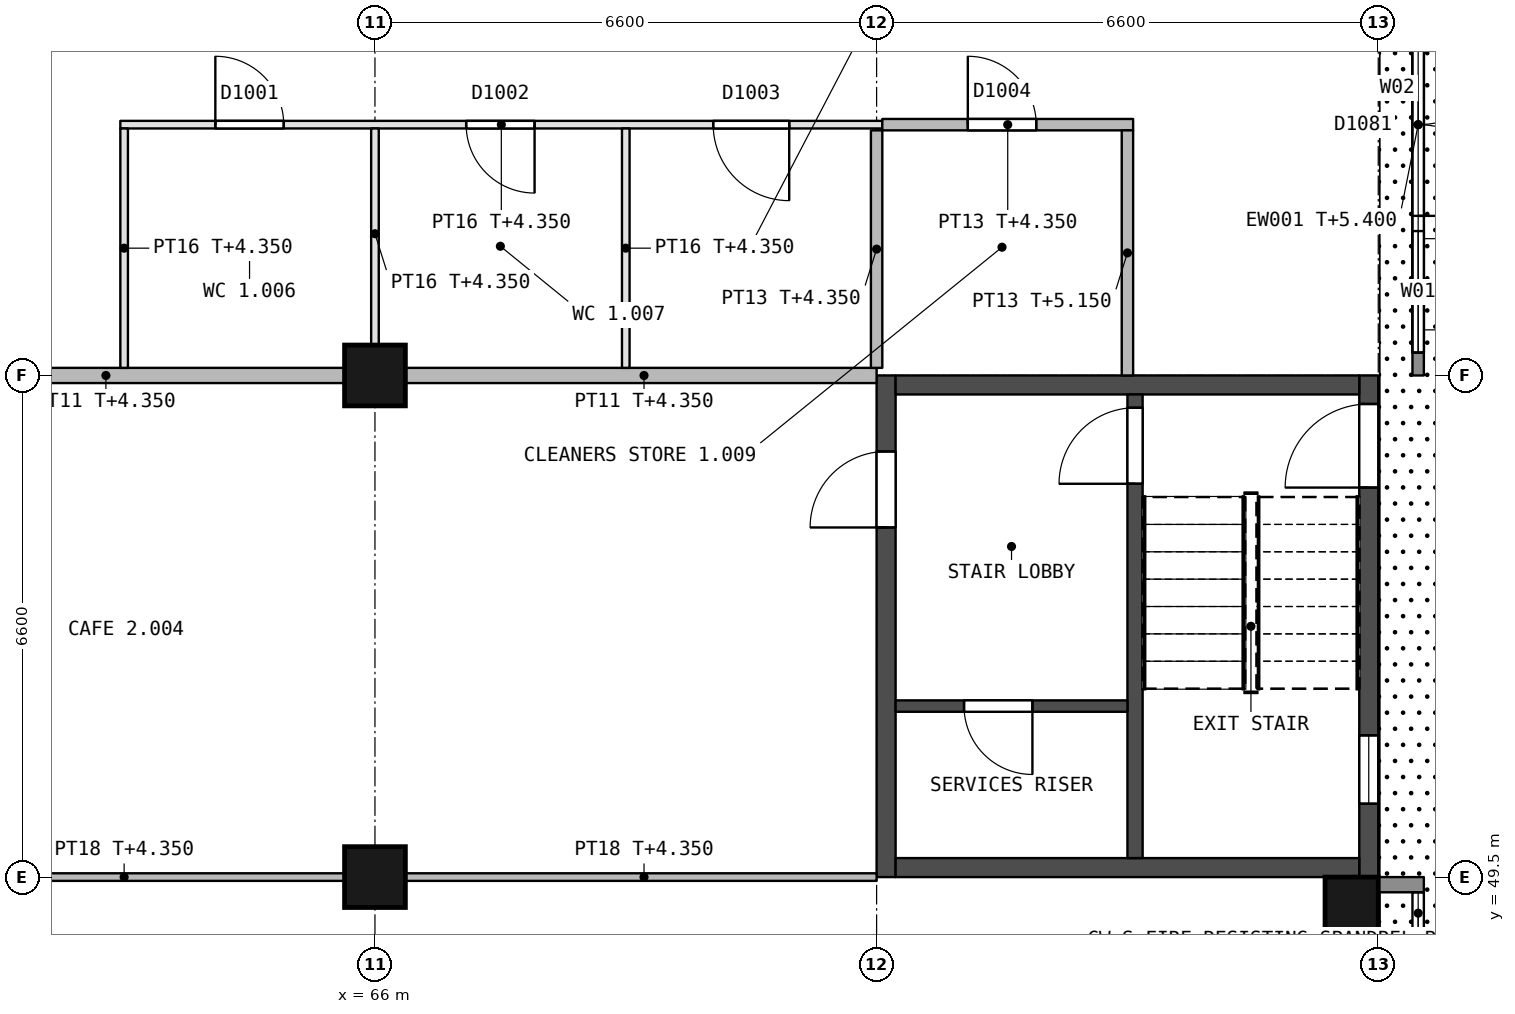
"""IFC4 building model, lengths in metres.
Left out: names, types, materials, properties, quantities, classifications, styles, units other than length and angle.
Written with IfcOpenShell. Run it as: python <this file> out.ifc"""

import sys

from ifc_helpers import new_model, si_unit, direction, frame, frame_2d, origin, origin_2d, place, context, subcontext, project, spatial, rectangle, extrude, element, fill, save


model = new_model("IFC4")
c1 = context("Model", 3, precision=1e-05, world=origin(), true_north=direction((0.0, 1.0)))
c2 = subcontext(c1, "Body", "Model", "MODEL_VIEW")
j1 = project(units=[si_unit("LENGTHUNIT", "METRE"), si_unit("PLANEANGLEUNIT", "RADIAN")], contexts=[c1])
p1 = place(None, origin())
s1 = spatial("IfcSite", under=j1, at=p1, CompositionType="ELEMENT")
p2 = place(p1, origin())
s2 = spatial("IfcBuilding", under=s1, at=p2, CompositionType="ELEMENT")
p3 = place(p2, origin())
s3 = spatial("IfcBuildingStorey", under=s2, at=p3, CompositionType="ELEMENT", Elevation=0.0)
p4 = place(p3, frame((66.0, 56.1, 0.0), z_axis=(0.0, 0.0, 1.0), x_axis=(1.0, 0.0, 0.0)))
e1 = element("IfcColumn", 1, at=p4, inside=s3, PredefinedType="COLUMN", context=c2, shape_type="SweptSolid", body=[
    extrude(rectangle(XDim=0.8, YDim=0.8, at=origin_2d()), origin(), (0.0, 0.0, 1.0), 5.4),
])
p5 = place(p3, frame((78.85, 49.15, 0.0), z_axis=(0.0, 0.0, 1.0), x_axis=(1.0, 0.0, 0.0)))
e2 = element("IfcColumn", 2, at=p5, inside=s3, PredefinedType="COLUMN", context=c2, shape_type="SweptSolid", body=[
    extrude(rectangle(XDim=0.7, YDim=0.7, at=origin_2d()), origin(), (0.0, 0.0, 1.0), 5.4),
])
p6 = place(p3, frame((66.0, 49.5, 0.0), z_axis=(0.0, 0.0, 1.0), x_axis=(1.0, 0.0, 0.0)))
e3 = element("IfcColumn", 3, at=p6, inside=s3, PredefinedType="COLUMN", context=c2, shape_type="SweptSolid", body=[
    extrude(rectangle(XDim=0.8, YDim=0.8, at=origin_2d()), origin(), (0.0, 0.0, 1.0), 5.4),
])
p7 = place(p3, frame((72.725, 56.1, 0.0), z_axis=(0.0, 0.0, 1.0), x_axis=(0.0, -1.0, 0.0)))
e4 = element("IfcWall", 4, at=p7, inside=s3, PredefinedType="SHEAR", context=c2, shape_type="SweptSolid", body=[
    extrude(rectangle(XDim=6.6, YDim=0.25, at=frame_2d((3.3, 0.0))), origin(), (0.0, 0.0, 1.0), 5.15),
])
p8 = place(p7, frame((1.0, 0.0, 0.0)))
e5 = element("IfcOpeningElement", 5, at=p8, cuts=e4, PredefinedType="OPENING", context=c2, shape_type="SweptSolid", body=[
    extrude(rectangle(XDim=1.0, YDim=2.1, at=frame_2d((0.5, 1.05))), frame((0.0, 0.135, 0.0), z_axis=(0.0, -1.0, 0.0), x_axis=(1.0, 0.0, 0.0)), (0.0, 0.0, 1.0), 0.27),
])
p9 = place(p3, frame((79.075, 56.1, 0.0), z_axis=(0.0, 0.0, 1.0), x_axis=(0.0, -1.0, 0.0)))
e6 = element("IfcWall", 6, at=p9, inside=s3, PredefinedType="SHEAR", context=c2, shape_type="SweptSolid", body=[
    extrude(rectangle(XDim=6.6, YDim=0.25, at=frame_2d((3.3, 0.0))), origin(), (0.0, 0.0, 1.0), 5.15),
])
p10 = place(p9, frame((0.375, 0.0, 0.0)))
e7 = element("IfcOpeningElement", 7, at=p10, cuts=e6, PredefinedType="OPENING", context=c2, shape_type="SweptSolid", body=[
    extrude(rectangle(XDim=1.1, YDim=2.4, at=frame_2d((0.55, 1.2))), frame((0.0, 0.135, 0.0), z_axis=(0.0, -1.0, 0.0), x_axis=(1.0, 0.0, 0.0)), (0.0, 0.0, 1.0), 0.27),
])
p11 = place(p9, frame((4.735, 0.0, 2.05)))
e8 = element("IfcOpeningElement", 8, at=p11, cuts=e6, PredefinedType="OPENING", context=c2, shape_type="SweptSolid", body=[
    extrude(rectangle(XDim=0.9, YDim=1.2, at=frame_2d((0.45, 0.6))), frame((0.0, 0.135, 0.0), z_axis=(0.0, -1.0, 0.0), x_axis=(1.0, 0.0, 0.0)), (0.0, 0.0, 1.0), 0.27),
])
for number, where, z_axis, x_axis in (
    (9, (72.85, 55.975, 0.0), (0.0, 0.0, 1.0), (1.0, 0.0, 0.0)),
    (10, (72.85, 49.625, 0.0), (0.0, 0.0, 1.0), (1.0, 0.0, 0.0)),
):
    element("IfcWall", number, at=place(p3, frame(where, z_axis=z_axis, x_axis=x_axis)), inside=s3, PredefinedType="SHEAR", context=c2, shape_type="SweptSolid", body=[
        extrude(rectangle(XDim=6.1, YDim=0.25, at=frame_2d((3.05, 0.0))), origin(), (0.0, 0.0, 1.0), 5.15),
    ])
p12 = place(p3, frame((76.0, 55.85, 0.0), z_axis=(0.0, 0.0, 1.0), x_axis=(0.0, -1.0, 0.0)))
e11 = element("IfcWall", 11, at=p12, inside=s3, PredefinedType="SHEAR", context=c2, shape_type="SweptSolid", body=[
    extrude(rectangle(XDim=6.1, YDim=0.2, at=frame_2d((3.05, 0.0))), origin(), (0.0, 0.0, 1.0), 5.15),
])
p13 = place(p12, frame((0.175, 0.0, 0.0)))
e12 = element("IfcOpeningElement", 12, at=p13, cuts=e11, PredefinedType="OPENING", context=c2, shape_type="SweptSolid", body=[
    extrude(rectangle(XDim=1.0, YDim=2.1, at=frame_2d((0.5, 1.05))), frame((0.0, 0.11, 0.0), z_axis=(0.0, -1.0, 0.0), x_axis=(1.0, 0.0, 0.0)), (0.0, 0.0, 1.0), 0.22),
])
p14 = place(p3, frame((72.85, 51.75, 0.0), z_axis=(0.0, 0.0, 1.0), x_axis=(1.0, 0.0, 0.0)))
e13 = element("IfcWall", 13, at=p14, inside=s3, PredefinedType="SHEAR", context=c2, shape_type="SweptSolid", body=[
    extrude(rectangle(XDim=3.05, YDim=0.15, at=frame_2d((1.525, 0.0))), origin(), (0.0, 0.0, 1.0), 5.15),
])
p15 = place(p14, frame((0.9, 0.0, 0.0)))
e14 = element("IfcOpeningElement", 14, at=p15, cuts=e13, PredefinedType="OPENING", context=c2, shape_type="SweptSolid", body=[
    extrude(rectangle(XDim=0.9, YDim=2.1, at=frame_2d((0.45, 1.05))), frame((0.0, 0.085, 0.0), z_axis=(0.0, -1.0, 0.0), x_axis=(1.0, 0.0, 0.0)), (0.0, 0.0, 1.0), 0.17),
])
p16 = place(p3, frame((79.725, 62.7, 0.0), z_axis=(0.0, 0.0, 1.0), x_axis=(0.0, -1.0, 0.0)))
e15 = element("IfcWall", 15, at=p16, inside=s3, PredefinedType="STANDARD", context=c2, shape_type="SweptSolid", body=[
    extrude(rectangle(XDim=6.6, YDim=0.15, at=frame_2d((3.3, 0.0))), origin(), (0.0, 0.0, 1.0), 5.4),
])
p17 = place(p16, frame((2.1, 0.0, 0.0)))
e16 = element("IfcOpeningElement", 16, at=p17, cuts=e15, PredefinedType="OPENING", context=c2, shape_type="SweptSolid", body=[
    extrude(rectangle(XDim=2.4, YDim=2.1, at=frame_2d((1.2, 1.05))), frame((0.0, 0.085, 0.0), z_axis=(0.0, -1.0, 0.0), x_axis=(1.0, 0.0, 0.0)), (0.0, 0.0, 1.0), 0.17),
])
p18 = place(p16, frame((4.7, 0.0, 0.1)))
e17 = element("IfcOpeningElement", 17, at=p18, cuts=e15, PredefinedType="OPENING", context=c2, shape_type="SweptSolid", body=[
    extrude(rectangle(XDim=1.6, YDim=2.0, at=frame_2d((0.8, 1.0))), frame((0.0, 0.085, 0.0), z_axis=(0.0, -1.0, 0.0), x_axis=(1.0, 0.0, 0.0)), (0.0, 0.0, 1.0), 0.17),
])
p19 = place(p16, frame((0.3, 0.0, 0.1)))
e18 = element("IfcOpeningElement", 18, at=p19, cuts=e15, PredefinedType="OPENING", context=c2, shape_type="SweptSolid", body=[
    extrude(rectangle(XDim=1.6, YDim=2.0, at=frame_2d((0.8, 1.0))), frame((0.0, 0.085, 0.0), z_axis=(0.0, -1.0, 0.0), x_axis=(1.0, 0.0, 0.0)), (0.0, 0.0, 1.0), 0.17),
])
p20 = place(p16, frame((0.3, 0.0, 2.25)))
e19 = element("IfcOpeningElement", 19, at=p20, cuts=e15, PredefinedType="OPENING", context=c2, shape_type="SweptSolid", body=[
    extrude(rectangle(XDim=6.0, YDim=2.4, at=frame_2d((3.0, 1.2))), frame((0.0, 0.085, 0.0), z_axis=(0.0, -1.0, 0.0), x_axis=(1.0, 0.0, 0.0)), (0.0, 0.0, 1.0), 0.17),
])
p21 = place(p3, frame((79.2, 49.4, 0.0), z_axis=(0.0, 0.0, 1.0), x_axis=(1.0, 0.0, 0.0)))
e20 = element("IfcWall", 20, at=p21, inside=s3, PredefinedType="STANDARD", context=c2, shape_type="SweptSolid", body=[
    extrude(rectangle(XDim=0.6, YDim=0.2, at=frame_2d((0.3, 0.0))), origin(), (0.0, 0.0, 1.0), 5.4),
])
p22 = place(p3, frame((59.8, 49.5, 0.0), z_axis=(0.0, 0.0, 1.0), x_axis=(1.0, 0.0, 0.0)))
e21 = element("IfcWall", 21, at=p22, inside=s3, PredefinedType="PARTITIONING", context=c2, shape_type="SweptSolid", body=[
    extrude(rectangle(XDim=5.8, YDim=0.1, at=frame_2d((2.9, 0.0))), origin(), (0.0, 0.0, 1.0), 4.35),
])
p23 = place(p3, frame((66.4, 49.5, 0.0), z_axis=(0.0, 0.0, 1.0), x_axis=(1.0, 0.0, 0.0)))
e22 = element("IfcWall", 22, at=p23, inside=s3, PredefinedType="PARTITIONING", context=c2, shape_type="SweptSolid", body=[
    extrude(rectangle(XDim=6.2, YDim=0.1, at=frame_2d((3.1, 0.0))), origin(), (0.0, 0.0, 1.0), 4.35),
])
for number, where, z_axis, x_axis in (
    (23, (59.4, 56.1, 0.0), (0.0, 0.0, 1.0), (1.0, 0.0, 0.0)),
    (24, (66.4, 56.1, 0.0), (0.0, 0.0, 1.0), (1.0, 0.0, 0.0)),
):
    element("IfcWall", number, at=place(p3, frame(where, z_axis=z_axis, x_axis=x_axis)), inside=s3, PredefinedType="PARTITIONING", context=c2, shape_type="SweptSolid", body=[
        extrude(rectangle(XDim=6.2, YDim=0.2, at=frame_2d((3.1, 0.0))), origin(), (0.0, 0.0, 1.0), 4.35),
    ])
p24 = place(p3, frame((72.675, 59.4, 0.0), z_axis=(0.0, 0.0, 1.0), x_axis=(-1.0, 0.0, 0.0)))
e25 = element("IfcWall", 25, at=p24, inside=s3, PredefinedType="PARTITIONING", context=c2, shape_type="SweptSolid", body=[
    extrude(rectangle(XDim=10.025, YDim=0.1, at=frame_2d((5.013, 0.0))), origin(), (0.0, 0.0, 1.0), 4.35),
])
p25 = place(p24, frame((7.875, 0.0, 0.0)))
e26 = element("IfcOpeningElement", 26, at=p25, cuts=e25, PredefinedType="OPENING", context=c2, shape_type="SweptSolid", body=[
    extrude(rectangle(XDim=0.9, YDim=2.1, at=frame_2d((0.45, 1.05))), frame((0.0, 0.06, 0.0), z_axis=(0.0, -1.0, 0.0), x_axis=(1.0, 0.0, 0.0)), (0.0, 0.0, 1.0), 0.12),
])
p26 = place(p24, frame((4.575, 0.0, 0.0)))
e27 = element("IfcOpeningElement", 27, at=p26, cuts=e25, PredefinedType="OPENING", context=c2, shape_type="SweptSolid", body=[
    extrude(rectangle(XDim=0.9, YDim=2.1, at=frame_2d((0.45, 1.05))), frame((0.0, 0.06, 0.0), z_axis=(0.0, -1.0, 0.0), x_axis=(1.0, 0.0, 0.0)), (0.0, 0.0, 1.0), 0.12),
])
p27 = place(p24, frame((1.225, 0.0, 0.0)))
e28 = element("IfcOpeningElement", 28, at=p27, cuts=e25, PredefinedType="OPENING", context=c2, shape_type="SweptSolid", body=[
    extrude(rectangle(XDim=1.0, YDim=2.1, at=frame_2d((0.5, 1.05))), frame((0.0, 0.06, 0.0), z_axis=(0.0, -1.0, 0.0), x_axis=(1.0, 0.0, 0.0)), (0.0, 0.0, 1.0), 0.12),
])
p28 = place(p3, frame((75.975, 59.4, 0.0), z_axis=(0.0, 0.0, 1.0), x_axis=(-1.0, 0.0, 0.0)))
e29 = element("IfcWall", 29, at=p28, inside=s3, PredefinedType="PARTITIONING", context=c2, shape_type="SweptSolid", body=[
    extrude(rectangle(XDim=3.3, YDim=0.15, at=frame_2d((1.65, 0.0))), origin(), (0.0, 0.0, 1.0), 4.35),
])
p29 = place(p28, frame((1.275, 0.0, 0.0)))
e30 = element("IfcOpeningElement", 30, at=p29, cuts=e29, PredefinedType="OPENING", context=c2, shape_type="SweptSolid", body=[
    extrude(rectangle(XDim=0.9, YDim=2.1, at=frame_2d((0.45, 1.05))), frame((0.0, 0.085, 0.0), z_axis=(0.0, -1.0, 0.0), x_axis=(1.0, 0.0, 0.0)), (0.0, 0.0, 1.0), 0.17),
])
p30 = place(p3, frame((62.7, 56.2, 0.0), z_axis=(0.0, 0.0, 1.0), x_axis=(0.0, 1.0, 0.0)))
e31 = element("IfcWall", 31, at=p30, inside=s3, PredefinedType="PARTITIONING", context=c2, shape_type="SweptSolid", body=[
    extrude(rectangle(XDim=3.15, YDim=0.1, at=frame_2d((1.575, 0.0))), origin(), (0.0, 0.0, 1.0), 4.35),
])
p31 = place(p3, frame((66.0, 56.5, 0.0), z_axis=(0.0, 0.0, 1.0), x_axis=(0.0, 1.0, 0.0)))
e32 = element("IfcWall", 32, at=p31, inside=s3, PredefinedType="PARTITIONING", context=c2, shape_type="SweptSolid", body=[
    extrude(rectangle(XDim=2.85, YDim=0.1, at=frame_2d((1.425, 0.0))), origin(), (0.0, 0.0, 1.0), 4.35),
])
p32 = place(p3, frame((69.3, 56.2, 0.0), z_axis=(0.0, 0.0, 1.0), x_axis=(0.0, 1.0, 0.0)))
e33 = element("IfcWall", 33, at=p32, inside=s3, PredefinedType="PARTITIONING", context=c2, shape_type="SweptSolid", body=[
    extrude(rectangle(XDim=3.15, YDim=0.1, at=frame_2d((1.575, 0.0))), origin(), (0.0, 0.0, 1.0), 4.35),
])
p33 = place(p3, frame((72.6, 56.2, 0.0), z_axis=(0.0, 0.0, 1.0), x_axis=(0.0, 1.0, 0.0)))
e34 = element("IfcWall", 34, at=p33, inside=s3, PredefinedType="PARTITIONING", context=c2, shape_type="SweptSolid", body=[
    extrude(rectangle(XDim=3.125, YDim=0.15, at=frame_2d((1.562, 0.0))), origin(), (0.0, 0.0, 1.0), 4.35),
])
p34 = place(p3, frame((75.9, 56.1, 0.0), z_axis=(0.0, 0.0, 1.0), x_axis=(0.0, 1.0, 0.0)))
e35 = element("IfcWall", 35, at=p34, inside=s3, PredefinedType="PARTITIONING", context=c2, shape_type="SweptSolid", body=[
    extrude(rectangle(XDim=3.225, YDim=0.15, at=frame_2d((1.612, 0.0))), origin(), (0.0, 0.0, 1.0), 5.15),
])
p35 = place(p15, origin())
e36 = element("IfcDoor", 36, at=p35, inside=s3, OperationType="SINGLE_SWING_RIGHT", PredefinedType="DOOR", context=c2, shape_type="SweptSolid", body=[
    extrude(rectangle(XDim=0.9, YDim=2.1, at=frame_2d((0.45, 1.05))), frame((0.0, 0.025, 0.0), z_axis=(0.0, -1.0, 0.0), x_axis=(1.0, 0.0, 0.0)), (0.0, 0.0, 1.0), 0.05),
])
fill(e14, e36)
p36 = place(p8, origin())
e37 = element("IfcDoor", 37, at=p36, inside=s3, OperationType="SINGLE_SWING_RIGHT", PredefinedType="DOOR", context=c2, shape_type="SweptSolid", body=[
    extrude(rectangle(XDim=1.0, YDim=2.1, at=frame_2d((0.5, 1.05))), frame((0.0, 0.025, 0.0), z_axis=(0.0, -1.0, 0.0), x_axis=(1.0, 0.0, 0.0)), (0.0, 0.0, 1.0), 0.05),
])
fill(e5, e37)
p37 = place(p13, origin())
e38 = element("IfcDoor", 38, at=p37, inside=s3, OperationType="SINGLE_SWING_RIGHT", PredefinedType="DOOR", context=c2, shape_type="SweptSolid", body=[
    extrude(rectangle(XDim=1.0, YDim=2.1, at=frame_2d((0.5, 1.05))), frame((0.0, 0.025, 0.0), z_axis=(0.0, -1.0, 0.0), x_axis=(1.0, 0.0, 0.0)), (0.0, 0.0, 1.0), 0.05),
])
fill(e12, e38)
p38 = place(p10, origin())
e39 = element("IfcDoor", 39, at=p38, inside=s3, OperationType="SINGLE_SWING_RIGHT", PredefinedType="DOOR", context=c2, shape_type="SweptSolid", body=[
    extrude(rectangle(XDim=1.1, YDim=2.4, at=frame_2d((0.55, 1.2))), frame((0.0, 0.025, 0.0), z_axis=(0.0, -1.0, 0.0), x_axis=(1.0, 0.0, 0.0)), (0.0, 0.0, 1.0), 0.05),
])
fill(e7, e39)
p39 = place(p11, origin())
e40 = element("IfcWindow", 40, at=p39, inside=s3, PartitioningType="SINGLE_PANEL", PredefinedType="WINDOW", context=c2, shape_type="SweptSolid", body=[
    extrude(rectangle(XDim=0.9, YDim=1.2, at=frame_2d((0.45, 0.6))), frame((0.0, 0.03, 0.0), z_axis=(0.0, -1.0, 0.0), x_axis=(1.0, 0.0, 0.0)), (0.0, 0.0, 1.0), 0.06),
])
fill(e8, e40)
p40 = place(p17, origin())
e41 = element("IfcDoor", 41, at=p40, inside=s3, OperationType="DOUBLE_DOOR_SINGLE_SWING", PredefinedType="DOOR", context=c2, shape_type="SweptSolid", body=[
    extrude(rectangle(XDim=2.4, YDim=2.1, at=frame_2d((1.2, 1.05))), frame((0.0, 0.025, 0.0), z_axis=(0.0, -1.0, 0.0), x_axis=(1.0, 0.0, 0.0)), (0.0, 0.0, 1.0), 0.05),
])
fill(e16, e41)
p41 = place(p18, origin())
e42 = element("IfcWindow", 42, at=p41, inside=s3, PartitioningType="SINGLE_PANEL", PredefinedType="WINDOW", context=c2, shape_type="SweptSolid", body=[
    extrude(rectangle(XDim=1.6, YDim=2.0, at=frame_2d((0.8, 1.0))), frame((0.0, 0.03, 0.0), z_axis=(0.0, -1.0, 0.0), x_axis=(1.0, 0.0, 0.0)), (0.0, 0.0, 1.0), 0.06),
])
fill(e17, e42)
p42 = place(p20, origin())
e43 = element("IfcWindow", 43, at=p42, inside=s3, PartitioningType="SINGLE_PANEL", PredefinedType="WINDOW", context=c2, shape_type="SweptSolid", body=[
    extrude(rectangle(XDim=6.0, YDim=2.4, at=frame_2d((3.0, 1.2))), frame((0.0, 0.03, 0.0), z_axis=(0.0, -1.0, 0.0), x_axis=(1.0, 0.0, 0.0)), (0.0, 0.0, 1.0), 0.06),
])
fill(e19, e43)
p43 = place(p25, origin())
e44 = element("IfcDoor", 44, at=p43, inside=s3, OperationType="SINGLE_SWING_RIGHT", PredefinedType="DOOR", context=c2, shape_type="SweptSolid", body=[
    extrude(rectangle(XDim=0.9, YDim=2.1, at=frame_2d((0.45, 1.05))), frame((0.0, 0.025, 0.0), z_axis=(0.0, -1.0, 0.0), x_axis=(1.0, 0.0, 0.0)), (0.0, 0.0, 1.0), 0.05),
])
fill(e26, e44)
p44 = place(p26, origin())
e45 = element("IfcDoor", 45, at=p44, inside=s3, OperationType="SINGLE_SWING_LEFT", PredefinedType="DOOR", context=c2, shape_type="SweptSolid", body=[
    extrude(rectangle(XDim=0.9, YDim=2.1, at=frame_2d((0.45, 1.05))), frame((0.0, 0.025, 0.0), z_axis=(0.0, -1.0, 0.0), x_axis=(1.0, 0.0, 0.0)), (0.0, 0.0, 1.0), 0.05),
])
fill(e27, e45)
p45 = place(p27, origin())
e46 = element("IfcDoor", 46, at=p45, inside=s3, OperationType="SINGLE_SWING_LEFT", PredefinedType="DOOR", context=c2, shape_type="SweptSolid", body=[
    extrude(rectangle(XDim=1.0, YDim=2.1, at=frame_2d((0.5, 1.05))), frame((0.0, 0.025, 0.0), z_axis=(0.0, -1.0, 0.0), x_axis=(1.0, 0.0, 0.0)), (0.0, 0.0, 1.0), 0.05),
])
fill(e28, e46)
p46 = place(p29, origin())
e47 = element("IfcDoor", 47, at=p46, inside=s3, OperationType="SINGLE_SWING_RIGHT", PredefinedType="DOOR", context=c2, shape_type="SweptSolid", body=[
    extrude(rectangle(XDim=0.9, YDim=2.1, at=frame_2d((0.45, 1.05))), frame((0.0, 0.025, 0.0), z_axis=(0.0, -1.0, 0.0), x_axis=(1.0, 0.0, 0.0)), (0.0, 0.0, 1.0), 0.05),
])
fill(e30, e47)
save(model, sys.argv[1])
